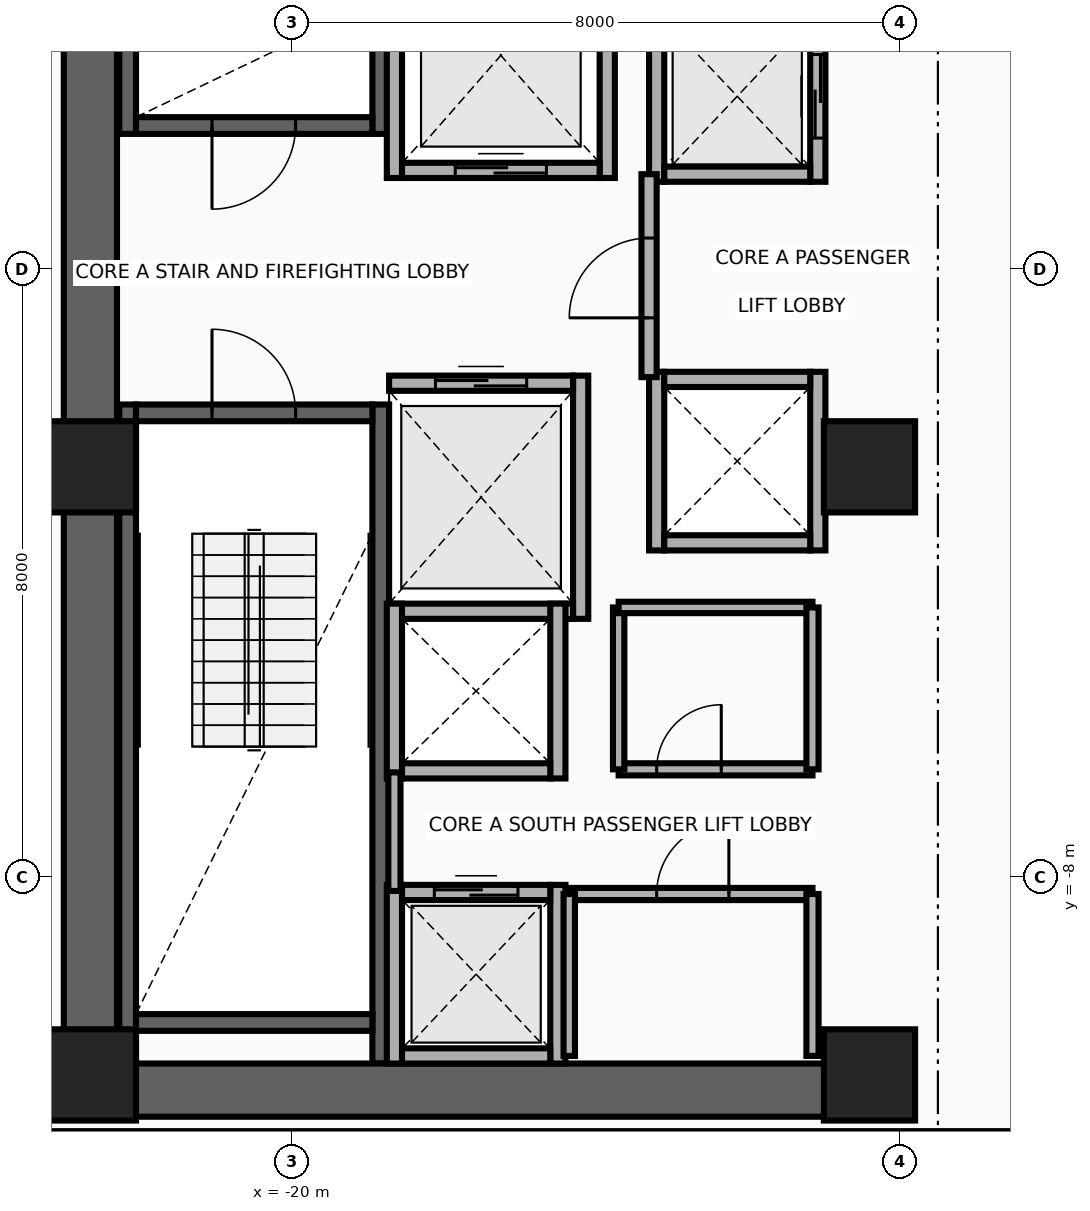
"""IFC4 building model, lengths in metres.
Left out: names, types, materials, properties, quantities, classifications, styles, units other than length and angle.
Written with IfcOpenShell. Run it as: python <this file> out.ifc"""

import sys

from ifc_helpers import new_model, si_unit, direction, frame, frame_2d, origin, origin_2d, place, context, subcontext, project, spatial, rectangle, extrude, source, transform, mapped, element, fill, save


model = new_model("IFC4")
c1 = context("Model", 3, precision=1e-05, world=origin(), true_north=direction((0.0, 1.0)))
c2 = subcontext(c1, "Body", "Model", "MODEL_VIEW")
j1 = project(units=[si_unit("LENGTHUNIT", "METRE"), si_unit("PLANEANGLEUNIT", "RADIAN")], contexts=[c1])
p1 = place(None, origin())
s1 = spatial("IfcSite", under=j1, at=p1, CompositionType="ELEMENT")
p2 = place(p1, origin())
s2 = spatial("IfcBuilding", under=s1, at=p2, CompositionType="ELEMENT")
p3 = place(p2, frame((0.0, 0.0, 113.1)))
s3 = spatial("IfcBuildingStorey", under=s2, at=p3, CompositionType="ELEMENT", Elevation=113.1)
for number, where, z_axis, x_axis in (
    (1, (-22.16, 1.78, 0.0), (0.0, 0.0, 1.0), (0.0, 1.0, 0.0)),
    (2, (-18.83, 1.78, 0.0), (0.0, 0.0, 1.0), (0.0, 1.0, 0.0)),
):
    element("IfcWall", number, at=place(p3, frame(where, z_axis=z_axis, x_axis=x_axis)), inside=s3, PredefinedType="SHEAR", context=c2, shape_type="SweptSolid", body=[
        extrude(rectangle(XDim=8.67, YDim=0.22, at=frame_2d((4.335, 0.0))), origin(), (0.0, 0.0, 1.0), 3.46),
    ])
p4 = place(p3, frame((-22.05, 1.89, 0.0), z_axis=(0.0, 0.0, 1.0), x_axis=(1.0, 0.0, 0.0)))
e3 = element("IfcWall", 3, at=p4, inside=s3, PredefinedType="SHEAR", context=c2, shape_type="SweptSolid", body=[
    extrude(rectangle(XDim=3.11, YDim=0.22, at=frame_2d((1.555, 0.0))), origin(), (0.0, 0.0, 1.0), 3.46),
])
p5 = place(p4, frame((1.0, 0.0, 0.0)))
e4 = element("IfcOpeningElement", 4, at=p5, cuts=e3, PredefinedType="OPENING", context=c2, shape_type="SweptSolid", body=[
    extrude(rectangle(XDim=1.1, YDim=2.15, at=frame_2d((0.55, 1.075))), frame((0.0, 0.125, 0.0), z_axis=(0.0, -1.0, 0.0), x_axis=(1.0, 0.0, 0.0)), (0.0, 0.0, 1.0), 0.25),
])
for number, where, z_axis, x_axis in (
    (5, (-22.16, -10.45, 0.0), (0.0, 0.0, 1.0), (0.0, 1.0, 0.0)),
    (6, (-18.83, -10.45, 0.0), (0.0, 0.0, 1.0), (0.0, 1.0, 0.0)),
):
    element("IfcWall", number, at=place(p3, frame(where, z_axis=z_axis, x_axis=x_axis)), inside=s3, PredefinedType="SHEAR", context=c2, shape_type="SweptSolid", body=[
        extrude(rectangle(XDim=8.67, YDim=0.22, at=frame_2d((4.335, 0.0))), origin(), (0.0, 0.0, 1.0), 3.46),
    ])
p6 = place(p3, frame((-22.05, -9.91, 0.0), z_axis=(0.0, 0.0, 1.0), x_axis=(1.0, 0.0, 0.0)))
e7 = element("IfcWall", 7, at=p6, inside=s3, PredefinedType="SHEAR", context=c2, shape_type="SweptSolid", body=[
    extrude(rectangle(XDim=3.11, YDim=0.22, at=frame_2d((1.555, 0.0))), origin(), (0.0, 0.0, 1.0), 3.46),
])
p7 = place(p3, frame((-22.05, -1.89, 0.0), z_axis=(0.0, 0.0, 1.0), x_axis=(1.0, 0.0, 0.0)))
e8 = element("IfcWall", 8, at=p7, inside=s3, PredefinedType="SHEAR", context=c2, shape_type="SweptSolid", body=[
    extrude(rectangle(XDim=3.11, YDim=0.22, at=frame_2d((1.555, 0.0))), origin(), (0.0, 0.0, 1.0), 3.46),
])
p8 = place(p7, frame((1.0, 0.0, 0.0)))
e9 = element("IfcOpeningElement", 9, at=p8, cuts=e8, PredefinedType="OPENING", context=c2, shape_type="SweptSolid", body=[
    extrude(rectangle(XDim=1.1, YDim=2.15, at=frame_2d((0.55, 1.075))), frame((0.0, 0.125, 0.0), z_axis=(0.0, -1.0, 0.0), x_axis=(1.0, 0.0, 0.0)), (0.0, 0.0, 1.0), 0.25),
])
p9 = place(p3, frame((-22.65, -11.15, 0.0), z_axis=(0.0, 0.0, 1.0), x_axis=(0.0, 1.0, 0.0)))
e10 = element("IfcWall", 10, at=p9, inside=s3, PredefinedType="SHEAR", context=c2, shape_type="SweptSolid", body=[
    extrude(rectangle(XDim=22.3, YDim=0.7, at=frame_2d((11.15, 0.0))), origin(), (0.0, 0.0, 1.0), 3.46),
])
p10 = place(p3, frame((-22.65, -10.8, 0.0), z_axis=(0.0, 0.0, 1.0), x_axis=(1.0, 0.0, 0.0)))
e11 = element("IfcWall", 11, at=p10, inside=s3, PredefinedType="SHEAR", context=c2, shape_type="SweptSolid", body=[
    extrude(rectangle(XDim=10.25, YDim=0.7, at=frame_2d((5.125, 0.0))), origin(), (0.0, 0.0, 1.0), 3.46),
])
m1 = source(origin(), c2, "Body", "SweptSolid", [
    extrude(rectangle(XDim=1.2, YDim=1.2, at=origin_2d()), origin(), (0.0, 0.0, 1.0), 3.7),
])
for number, where, z_axis, x_axis in (
    (12, (-22.65, -10.6, 0.0), (0.0, 0.0, 1.0), (1.0, 0.0, 0.0)),
    (13, (-12.4, -10.6, 0.0), (0.0, 0.0, 1.0), (1.0, 0.0, 0.0)),
    (14, (-22.65, -2.6, 0.0), (0.0, 0.0, 1.0), (1.0, 0.0, 0.0)),
    (15, (-12.4, -2.6, 0.0), (0.0, 0.0, 1.0), (1.0, 0.0, 0.0)),
):
    element("IfcColumn", number, at=place(p3, frame(where, z_axis=z_axis, x_axis=x_axis)), inside=s3, PredefinedType="COLUMN", context=c2, shape_type="MappedRepresentation", body=[
        mapped(m1, transform((0.0, 0.0, 0.0), x_axis=(1.0, 0.0, 0.0), y_axis=(0.0, 1.0, 0.0), z_axis=(0.0, 0.0, 1.0), scale=1.0)),
    ])
for number, where, z_axis, x_axis in (
    (16, (-18.65, 1.2, 0.0), (0.0, 0.0, 1.0), (0.0, 1.0, 0.0)),
    (17, (-15.85, 1.2, 0.0), (0.0, 0.0, 1.0), (0.0, 1.0, 0.0)),
):
    element("IfcWall", number, at=place(p3, frame(where, z_axis=z_axis, x_axis=x_axis)), inside=s3, PredefinedType="MOVABLE", context=c2, shape_type="SweptSolid", body=[
        extrude(rectangle(XDim=3.225, YDim=0.2, at=frame_2d((1.613, 0.0))), origin(), (0.0, 0.0, 1.0), 3.46),
    ])
p11 = place(p3, frame((-18.55, 1.3, 0.0), z_axis=(0.0, 0.0, 1.0), x_axis=(1.0, 0.0, 0.0)))
e18 = element("IfcWall", 18, at=p11, inside=s3, PredefinedType="MOVABLE", context=c2, shape_type="SweptSolid", body=[
    extrude(rectangle(XDim=2.6, YDim=0.2, at=frame_2d((1.3, 0.0))), origin(), (0.0, 0.0, 1.0), 3.46),
])
p12 = place(p11, frame((0.7, 0.0, 0.0)))
e19 = element("IfcOpeningElement", 19, at=p12, cuts=e18, PredefinedType="OPENING", context=c2, shape_type="SweptSolid", body=[
    extrude(rectangle(XDim=1.2, YDim=2.1, at=frame_2d((0.6, 1.05))), frame((0.0, 0.115, 0.0), z_axis=(0.0, -1.0, 0.0), x_axis=(1.0, 0.0, 0.0)), (0.0, 0.0, 1.0), 0.23),
])
p13 = place(p3, frame((-16.2, -4.6, 0.0), z_axis=(0.0, 0.0, 1.0), x_axis=(0.0, 1.0, 0.0)))
e20 = element("IfcWall", 20, at=p13, inside=s3, PredefinedType="MOVABLE", context=c2, shape_type="SweptSolid", body=[
    extrude(rectangle(XDim=3.2, YDim=0.2, at=frame_2d((1.6, 0.0))), origin(), (0.0, 0.0, 1.0), 3.46),
])
p14 = place(p3, frame((-18.72, -4.5, 0.0), z_axis=(0.0, 0.0, 1.0), x_axis=(1.0, 0.0, 0.0)))
e21 = element("IfcWall", 21, at=p14, inside=s3, PredefinedType="MOVABLE", context=c2, shape_type="SweptSolid", body=[
    extrude(rectangle(XDim=2.42, YDim=0.2, at=frame_2d((1.21, 0.0))), origin(), (0.0, 0.0, 1.0), 3.46),
])
p15 = place(p3, frame((-18.72, -1.5, 0.0), z_axis=(0.0, 0.0, 1.0), x_axis=(1.0, 0.0, 0.0)))
e22 = element("IfcWall", 22, at=p15, inside=s3, PredefinedType="MOVABLE", context=c2, shape_type="SweptSolid", body=[
    extrude(rectangle(XDim=2.42, YDim=0.2, at=frame_2d((1.21, 0.0))), origin(), (0.0, 0.0, 1.0), 3.46),
])
p16 = place(p15, frame((0.61, 0.0, 0.0)))
e23 = element("IfcOpeningElement", 23, at=p16, cuts=e22, PredefinedType="OPENING", context=c2, shape_type="SweptSolid", body=[
    extrude(rectangle(XDim=1.2, YDim=2.1, at=frame_2d((0.6, 1.05))), frame((0.0, 0.115, 0.0), z_axis=(0.0, -1.0, 0.0), x_axis=(1.0, 0.0, 0.0)), (0.0, 0.0, 1.0), 0.23),
])
for number, where, z_axis, x_axis in (
    (24, (-18.65, -10.45, 0.0), (0.0, 0.0, 1.0), (0.0, 1.0, 0.0)),
    (25, (-16.5, -10.45, 0.0), (0.0, 0.0, 1.0), (0.0, 1.0, 0.0)),
):
    element("IfcWall", number, at=place(p3, frame(where, z_axis=z_axis, x_axis=x_axis)), inside=s3, PredefinedType="MOVABLE", context=c2, shape_type="SweptSolid", body=[
        extrude(rectangle(XDim=2.35, YDim=0.2, at=frame_2d((1.175, 0.0))), origin(), (0.0, 0.0, 1.0), 2.666),
    ])
p17 = place(p3, frame((-18.55, -10.35, 0.0), z_axis=(0.0, 0.0, 1.0), x_axis=(1.0, 0.0, 0.0)))
e26 = element("IfcWall", 26, at=p17, inside=s3, PredefinedType="MOVABLE", context=c2, shape_type="SweptSolid", body=[
    extrude(rectangle(XDim=1.95, YDim=0.2, at=frame_2d((0.975, 0.0))), origin(), (0.0, 0.0, 1.0), 2.666),
])
p18 = place(p3, frame((-18.55, -8.2, 0.0), z_axis=(0.0, 0.0, 1.0), x_axis=(1.0, 0.0, 0.0)))
e27 = element("IfcWall", 27, at=p18, inside=s3, PredefinedType="MOVABLE", context=c2, shape_type="SweptSolid", body=[
    extrude(rectangle(XDim=1.95, YDim=0.2, at=frame_2d((0.975, 0.0))), origin(), (0.0, 0.0, 1.0), 3.46),
])
p19 = place(p18, frame((0.425, 0.0, 0.0)))
e28 = element("IfcOpeningElement", 28, at=p19, cuts=e27, PredefinedType="OPENING", context=c2, shape_type="SweptSolid", body=[
    extrude(rectangle(XDim=1.1, YDim=2.1, at=frame_2d((0.55, 1.05))), frame((0.0, 0.115, 0.0), z_axis=(0.0, -1.0, 0.0), x_axis=(1.0, 0.0, 0.0)), (0.0, 0.0, 1.0), 0.23),
])
p20 = place(p3, frame((-15.2, 1.15, 0.0), z_axis=(0.0, 0.0, 1.0), x_axis=(0.0, 1.0, 0.0)))
e29 = element("IfcWall", 29, at=p20, inside=s3, PredefinedType="MOVABLE", context=c2, shape_type="SweptSolid", body=[
    extrude(rectangle(XDim=2.25, YDim=0.2, at=frame_2d((1.125, 0.0))), origin(), (0.0, 0.0, 1.0), 3.46),
])
p21 = place(p3, frame((-13.08, 1.15, 0.0), z_axis=(0.0, 0.0, 1.0), x_axis=(0.0, 1.0, 0.0)))
e30 = element("IfcWall", 30, at=p21, inside=s3, PredefinedType="MOVABLE", context=c2, shape_type="SweptSolid", body=[
    extrude(rectangle(XDim=2.25, YDim=0.2, at=frame_2d((1.125, 0.0))), origin(), (0.0, 0.0, 1.0), 3.46),
])
p22 = place(p21, frame((0.575, 0.0, 0.0)))
e31 = element("IfcOpeningElement", 31, at=p22, cuts=e30, PredefinedType="OPENING", context=c2, shape_type="SweptSolid", body=[
    extrude(rectangle(XDim=1.1, YDim=2.1, at=frame_2d((0.55, 1.05))), frame((0.0, 0.115, 0.0), z_axis=(0.0, -1.0, 0.0), x_axis=(1.0, 0.0, 0.0)), (0.0, 0.0, 1.0), 0.23),
])
p23 = place(p3, frame((-15.1, 1.25, 0.0), z_axis=(0.0, 0.0, 1.0), x_axis=(1.0, 0.0, 0.0)))
e32 = element("IfcWall", 32, at=p23, inside=s3, PredefinedType="MOVABLE", context=c2, shape_type="SweptSolid", body=[
    extrude(rectangle(XDim=1.92, YDim=0.2, at=frame_2d((0.96, 0.0))), origin(), (0.0, 0.0, 1.0), 3.46),
])
for number, where, z_axis, x_axis in (
    (33, (-18.65, -6.7, 0.0), (0.0, 0.0, 1.0), (0.0, 1.0, 0.0)),
    (34, (-16.5, -6.7, 0.0), (0.0, 0.0, 1.0), (0.0, 1.0, 0.0)),
):
    element("IfcWall", number, at=place(p3, frame(where, z_axis=z_axis, x_axis=x_axis)), inside=s3, PredefinedType="MOVABLE", context=c2, shape_type="SweptSolid", body=[
        extrude(rectangle(XDim=2.3, YDim=0.2, at=frame_2d((1.15, 0.0))), origin(), (0.0, 0.0, 1.0), 3.46),
    ])
p24 = place(p3, frame((-18.55, -6.6, 0.0), z_axis=(0.0, 0.0, 1.0), x_axis=(1.0, 0.0, 0.0)))
e35 = element("IfcWall", 35, at=p24, inside=s3, PredefinedType="MOVABLE", context=c2, shape_type="SweptSolid", body=[
    extrude(rectangle(XDim=1.95, YDim=0.2, at=frame_2d((0.975, 0.0))), origin(), (0.0, 0.0, 1.0), 3.46),
])
for number, where, z_axis, x_axis in (
    (36, (-15.2, -3.7, 0.0), (0.0, 0.0, 1.0), (0.0, 1.0, 0.0)),
    (37, (-13.08, -3.7, 0.0), (0.0, 0.0, 1.0), (0.0, 1.0, 0.0)),
):
    element("IfcWall", number, at=place(p3, frame(where, z_axis=z_axis, x_axis=x_axis)), inside=s3, PredefinedType="MOVABLE", context=c2, shape_type="SweptSolid", body=[
        extrude(rectangle(XDim=2.35, YDim=0.2, at=frame_2d((1.175, 0.0))), origin(), (0.0, 0.0, 1.0), 3.46),
    ])
for number, where, z_axis, x_axis in (
    (38, (-15.1, -3.6, 0.0), (0.0, 0.0, 1.0), (1.0, 0.0, 0.0)),
    (39, (-15.1, -1.45, 0.0), (0.0, 0.0, 1.0), (1.0, 0.0, 0.0)),
):
    element("IfcWall", number, at=place(p3, frame(where, z_axis=z_axis, x_axis=x_axis)), inside=s3, PredefinedType="MOVABLE", context=c2, shape_type="SweptSolid", body=[
        extrude(rectangle(XDim=1.92, YDim=0.2, at=frame_2d((0.96, 0.0))), origin(), (0.0, 0.0, 1.0), 3.46),
    ])
p25 = place(p3, frame((-15.3, -1.42, 0.0), z_axis=(0.0, 0.0, 1.0), x_axis=(0.0, 1.0, 0.0)))
e40 = element("IfcWall", 40, at=p25, inside=s3, PredefinedType="PARTITIONING", context=c2, shape_type="SweptSolid", body=[
    extrude(rectangle(XDim=2.67, YDim=0.2, at=frame_2d((1.335, 0.0))), origin(), (0.0, 0.0, 1.0), 3.46),
])
p26 = place(p25, frame((0.78, 0.0, 0.0)))
e41 = element("IfcOpeningElement", 41, at=p26, cuts=e40, PredefinedType="OPENING", context=c2, shape_type="SweptSolid", body=[
    extrude(rectangle(XDim=1.05, YDim=2.15, at=frame_2d((0.525, 1.075))), frame((0.0, 0.115, 0.0), z_axis=(0.0, -1.0, 0.0), x_axis=(1.0, 0.0, 0.0)), (0.0, 0.0, 1.0), 0.23),
])
p27 = place(p3, frame((-18.65, -8.18, 0.0), z_axis=(0.0, 0.0, 1.0), x_axis=(0.0, 1.0, 0.0)))
e42 = element("IfcWall", 42, at=p27, inside=s3, PredefinedType="PARTITIONING", context=c2, shape_type="SweptSolid", body=[
    extrude(rectangle(XDim=1.56, YDim=0.16, at=frame_2d((0.78, 0.0))), origin(), (0.0, 0.0, 1.0), 3.46),
])
p28 = place(p3, frame((-16.35, -8.22, 0.0), z_axis=(0.0, 0.0, 1.0), x_axis=(1.0, 0.0, 0.0)))
e43 = element("IfcWall", 43, at=p28, inside=s3, PredefinedType="PARTITIONING", context=c2, shape_type="SweptSolid", body=[
    extrude(rectangle(XDim=3.2, YDim=0.16, at=frame_2d((1.6, 0.0))), origin(), (0.0, 0.0, 1.0), 3.46),
])
p29 = place(p28, frame((1.15, 0.0, 0.0)))
e44 = element("IfcOpeningElement", 44, at=p29, cuts=e43, PredefinedType="OPENING", context=c2, shape_type="SweptSolid", body=[
    extrude(rectangle(XDim=0.95, YDim=2.15, at=frame_2d((0.475, 1.075))), frame((0.0, 0.095, 0.0), z_axis=(0.0, -1.0, 0.0), x_axis=(1.0, 0.0, 0.0)), (0.0, 0.0, 1.0), 0.19),
])
p30 = place(p3, frame((-16.35, -10.35, 0.0), z_axis=(0.0, 0.0, 1.0), x_axis=(0.0, 1.0, 0.0)))
e45 = element("IfcWall", 45, at=p30, inside=s3, PredefinedType="PARTITIONING", context=c2, shape_type="SweptSolid", body=[
    extrude(rectangle(XDim=2.13, YDim=0.15, at=frame_2d((1.065, 0.0))), origin(), (0.0, 0.0, 1.0), 3.46),
])
p31 = place(p3, frame((-13.15, -10.35, 0.0), z_axis=(0.0, 0.0, 1.0), x_axis=(0.0, 1.0, 0.0)))
e46 = element("IfcWall", 46, at=p31, inside=s3, PredefinedType="PARTITIONING", context=c2, shape_type="SweptSolid", body=[
    extrude(rectangle(XDim=2.13, YDim=0.16, at=frame_2d((1.065, 0.0))), origin(), (0.0, 0.0, 1.0), 3.46),
])
p32 = place(p3, frame((-15.7, -6.58, 0.0), z_axis=(0.0, 0.0, 1.0), x_axis=(1.0, 0.0, 0.0)))
e47 = element("IfcWall", 47, at=p32, inside=s3, PredefinedType="PARTITIONING", context=c2, shape_type="SweptSolid", body=[
    extrude(rectangle(XDim=2.55, YDim=0.16, at=frame_2d((1.275, 0.0))), origin(), (0.0, 0.0, 1.0), 3.46),
])
p33 = place(p32, frame((0.5, 0.0, 0.0)))
e48 = element("IfcOpeningElement", 48, at=p33, cuts=e47, PredefinedType="OPENING", context=c2, shape_type="SweptSolid", body=[
    extrude(rectangle(XDim=0.85, YDim=2.05, at=frame_2d((0.425, 1.025))), frame((0.0, 0.095, 0.0), z_axis=(0.0, -1.0, 0.0), x_axis=(1.0, 0.0, 0.0)), (0.0, 0.0, 1.0), 0.19),
])
p34 = place(p3, frame((-15.7, -6.58, 0.0), z_axis=(0.0, 0.0, 1.0), x_axis=(0.0, 1.0, 0.0)))
e49 = element("IfcWall", 49, at=p34, inside=s3, PredefinedType="PARTITIONING", context=c2, shape_type="SweptSolid", body=[
    extrude(rectangle(XDim=2.13, YDim=0.15, at=frame_2d((1.065, 0.0))), origin(), (0.0, 0.0, 1.0), 3.46),
])
p35 = place(p3, frame((-15.7, -4.45, 0.0), z_axis=(0.0, 0.0, 1.0), x_axis=(1.0, 0.0, 0.0)))
e50 = element("IfcWall", 50, at=p35, inside=s3, PredefinedType="PARTITIONING", context=c2, shape_type="SweptSolid", body=[
    extrude(rectangle(XDim=2.55, YDim=0.15, at=frame_2d((1.275, 0.0))), origin(), (0.0, 0.0, 1.0), 3.46),
])
p36 = place(p3, frame((-13.15, -6.58, 0.0), z_axis=(0.0, 0.0, 1.0), x_axis=(0.0, 1.0, 0.0)))
e51 = element("IfcWall", 51, at=p36, inside=s3, PredefinedType="PARTITIONING", context=c2, shape_type="SweptSolid", body=[
    extrude(rectangle(XDim=2.13, YDim=0.16, at=frame_2d((1.065, 0.0))), origin(), (0.0, 0.0, 1.0), 3.46),
])
p37 = place(p3, frame((-23.45, -11.42, 0.0), z_axis=(0.0, 0.0, 1.0), x_axis=(1.0, 0.0, 0.0)))
e52 = element("IfcWall", 52, at=p37, inside=s3, PredefinedType="PARTITIONING", context=c2, shape_type="SweptSolid", body=[
    extrude(rectangle(XDim=13.84, YDim=0.16, at=frame_2d((6.92, 0.0))), origin(), (0.0, 0.0, 1.0), 2.834),
])
p38 = place(p12, origin())
e53 = element("IfcDoor", 53, at=p38, inside=s3, OperationType="DOUBLE_DOOR_SLIDING", PredefinedType="DOOR", context=c2, shape_type="SweptSolid", body=[
    extrude(rectangle(XDim=1.2, YDim=2.1, at=frame_2d((0.6, 1.05))), frame((0.0, 0.025, 0.0), z_axis=(0.0, -1.0, 0.0), x_axis=(1.0, 0.0, 0.0)), (0.0, 0.0, 1.0), 0.05),
])
fill(e19, e53)
p39 = place(p16, origin())
e54 = element("IfcDoor", 54, at=p39, inside=s3, OperationType="DOUBLE_DOOR_SLIDING", PredefinedType="DOOR", context=c2, shape_type="SweptSolid", body=[
    extrude(rectangle(XDim=1.2, YDim=2.1, at=frame_2d((0.6, 1.05))), frame((0.0, 0.025, 0.0), z_axis=(0.0, -1.0, 0.0), x_axis=(1.0, 0.0, 0.0)), (0.0, 0.0, 1.0), 0.05),
])
fill(e23, e54)
p40 = place(p19, origin())
e55 = element("IfcDoor", 55, at=p40, inside=s3, OperationType="DOUBLE_DOOR_SLIDING", PredefinedType="DOOR", context=c2, shape_type="SweptSolid", body=[
    extrude(rectangle(XDim=1.1, YDim=2.1, at=frame_2d((0.55, 1.05))), frame((0.0, 0.025, 0.0), z_axis=(0.0, -1.0, 0.0), x_axis=(1.0, 0.0, 0.0)), (0.0, 0.0, 1.0), 0.05),
])
fill(e28, e55)
p41 = place(p22, origin())
e56 = element("IfcDoor", 56, at=p41, inside=s3, OperationType="DOUBLE_DOOR_SLIDING", PredefinedType="DOOR", context=c2, shape_type="SweptSolid", body=[
    extrude(rectangle(XDim=1.1, YDim=2.1, at=frame_2d((0.55, 1.05))), frame((0.0, 0.025, 0.0), z_axis=(0.0, -1.0, 0.0), x_axis=(1.0, 0.0, 0.0)), (0.0, 0.0, 1.0), 0.05),
])
fill(e31, e56)
p42 = place(p26, origin())
e57 = element("IfcDoor", 57, at=p42, inside=s3, OperationType="SINGLE_SWING_RIGHT", PredefinedType="DOOR", context=c2, shape_type="SweptSolid", body=[
    extrude(rectangle(XDim=1.05, YDim=2.15, at=frame_2d((0.525, 1.075))), frame((0.0, 0.025, 0.0), z_axis=(0.0, -1.0, 0.0), x_axis=(1.0, 0.0, 0.0)), (0.0, 0.0, 1.0), 0.05),
])
fill(e41, e57)
p43 = place(p5, frame((1.1, 0.0, 0.0), z_axis=(0.0, 0.0, 1.0), x_axis=(-1.0, 0.0, 0.0)))
e58 = element("IfcDoor", 58, at=p43, inside=s3, OperationType="SINGLE_SWING_LEFT", PredefinedType="DOOR", context=c2, shape_type="SweptSolid", body=[
    extrude(rectangle(XDim=1.1, YDim=2.15, at=frame_2d((0.55, 1.075))), frame((0.0, 0.025, 0.0), z_axis=(0.0, -1.0, 0.0), x_axis=(1.0, 0.0, 0.0)), (0.0, 0.0, 1.0), 0.05),
])
fill(e4, e58)
p44 = place(p8, origin())
e59 = element("IfcDoor", 59, at=p44, inside=s3, OperationType="SINGLE_SWING_RIGHT", PredefinedType="DOOR", context=c2, shape_type="SweptSolid", body=[
    extrude(rectangle(XDim=1.1, YDim=2.15, at=frame_2d((0.55, 1.075))), frame((0.0, 0.025, 0.0), z_axis=(0.0, -1.0, 0.0), x_axis=(1.0, 0.0, 0.0)), (0.0, 0.0, 1.0), 0.05),
])
fill(e9, e59)
p45 = place(p29, origin())
e60 = element("IfcDoor", 60, at=p45, inside=s3, OperationType="SINGLE_SWING_LEFT", PredefinedType="DOOR", context=c2, shape_type="SweptSolid", body=[
    extrude(rectangle(XDim=0.95, YDim=2.15, at=frame_2d((0.475, 1.075))), frame((0.0, 0.025, 0.0), z_axis=(0.0, -1.0, 0.0), x_axis=(1.0, 0.0, 0.0)), (0.0, 0.0, 1.0), 0.05),
])
fill(e44, e60)
p46 = place(p33, origin())
e61 = element("IfcDoor", 61, at=p46, inside=s3, OperationType="SINGLE_SWING_RIGHT", PredefinedType="DOOR", context=c2, shape_type="SweptSolid", body=[
    extrude(rectangle(XDim=0.85, YDim=2.05, at=frame_2d((0.425, 1.025))), frame((0.0, 0.025, 0.0), z_axis=(0.0, -1.0, 0.0), x_axis=(1.0, 0.0, 0.0)), (0.0, 0.0, 1.0), 0.05),
])
fill(e48, e61)
save(model, sys.argv[1])
